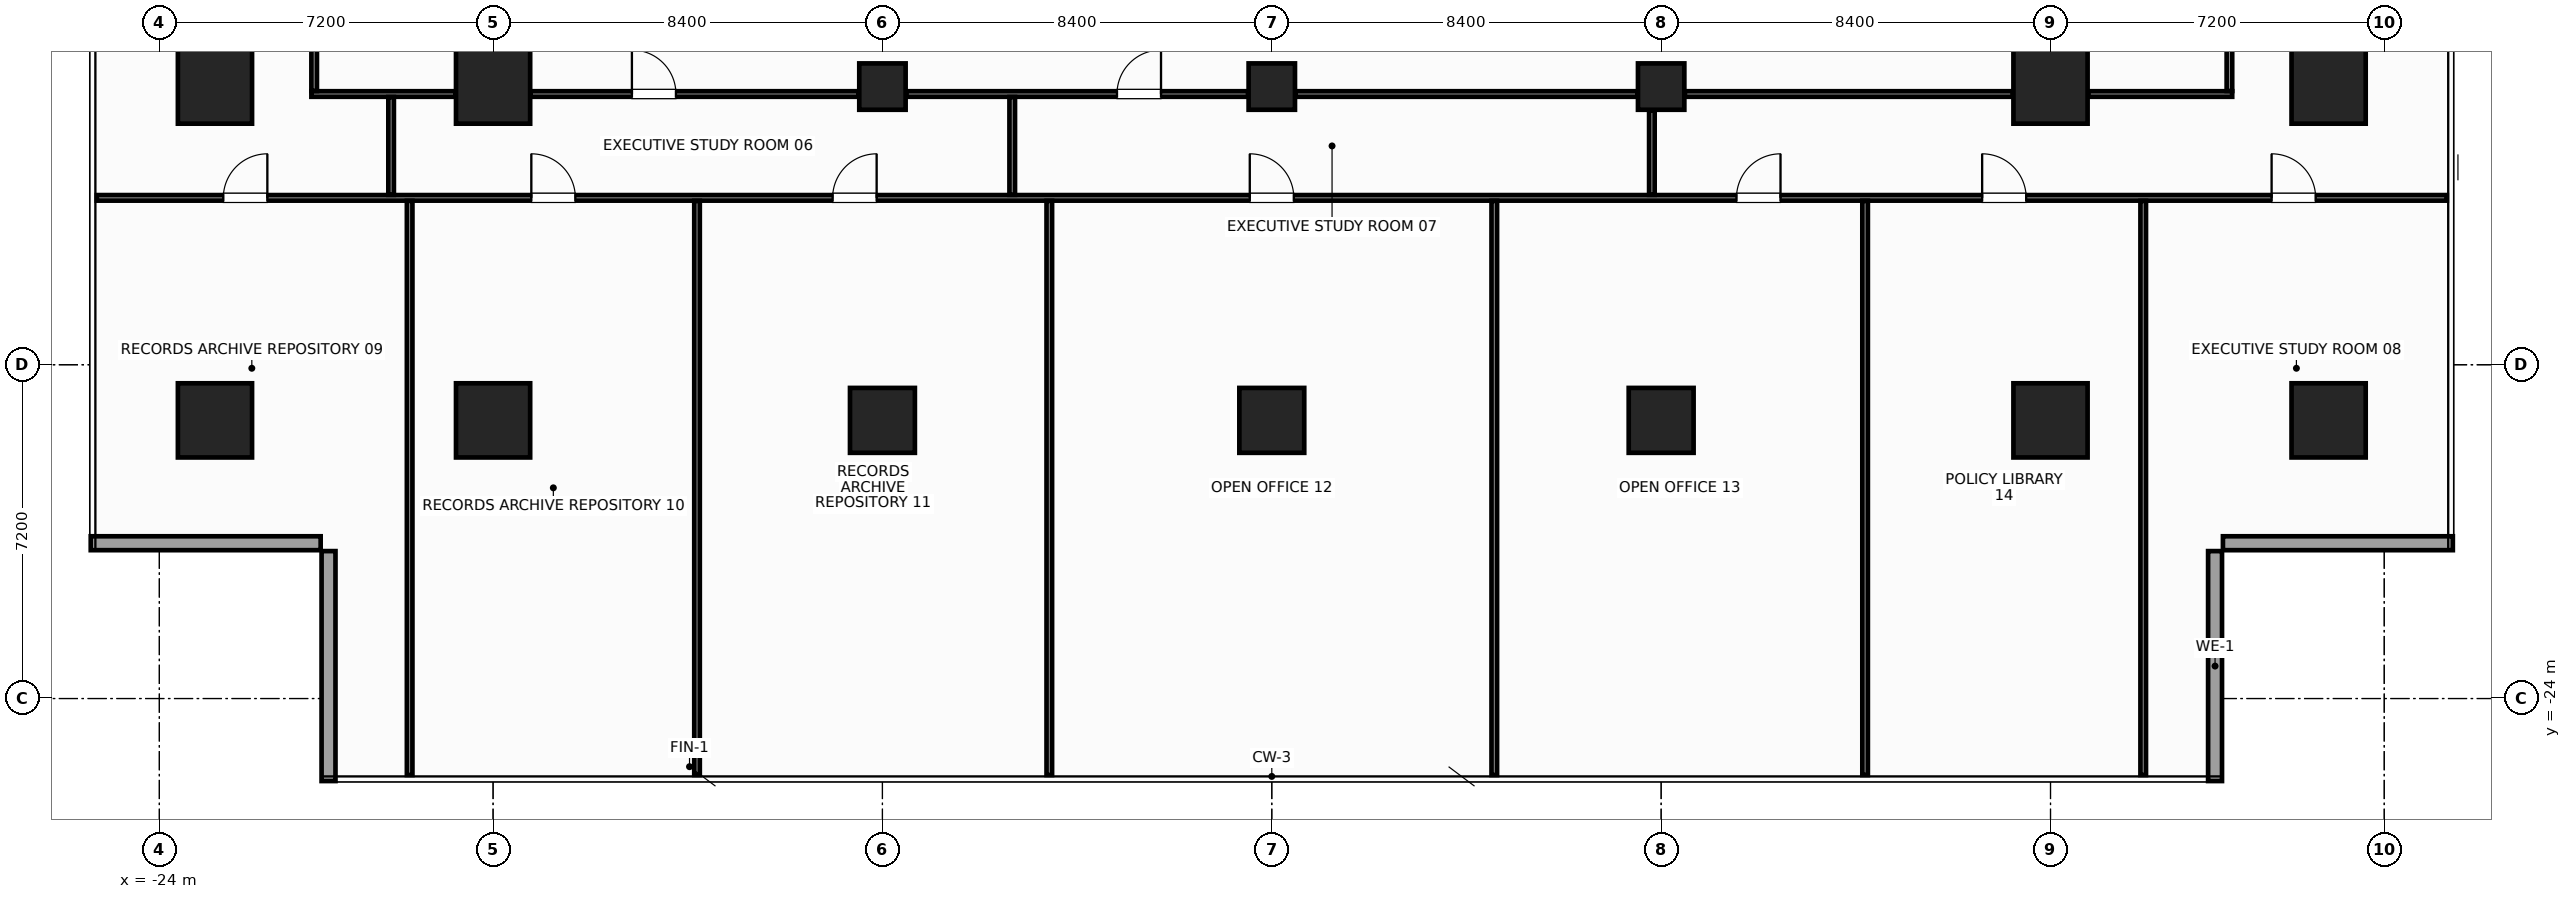
"""IFC4 building model, lengths in metres.
Left out: names, types, materials, properties, quantities, classifications, styles, units other than length and angle.
Written with IfcOpenShell. Run it as: python <this file> out.ifc"""

import sys

from ifc_helpers import new_model, si_unit, direction, frame, frame_2d, origin, origin_2d, place, context, subcontext, project, spatial, rectangle, hollow_rectangle, extrude, source, transform, mapped, element, fill, save


model = new_model("IFC4")
c1 = context("Model", 3, precision=1e-05, world=origin(), true_north=direction((0.0, 1.0)))
c2 = subcontext(c1, "Body", "Model", "MODEL_VIEW")
j1 = project(units=[si_unit("LENGTHUNIT", "METRE"), si_unit("PLANEANGLEUNIT", "RADIAN")], contexts=[c1])
p1 = place(None, origin())
s1 = spatial("IfcSite", under=j1, at=p1, CompositionType="ELEMENT")
p2 = place(p1, origin())
s2 = spatial("IfcBuilding", under=s1, at=p2, CompositionType="ELEMENT")
p3 = place(p2, frame((0.0, 0.0, 84.8)))
s3 = spatial("IfcBuildingStorey", under=s2, at=p3, CompositionType="ELEMENT", Elevation=84.8)
m1 = source(origin(), c2, "Body", "SweptSolid", [
    extrude(rectangle(XDim=1.6, YDim=1.6, at=origin_2d()), origin(), (0.0, 0.0, 1.0), 3.6),
])
for number, where, z_axis, x_axis in (
    (1, (-16.8, -18.0, 0.0), (0.0, 0.0, 1.0), (1.0, 0.0, 0.0)),
    (2, (-16.8, -10.8, 0.0), (0.0, 0.0, 1.0), (1.0, 0.0, 0.0)),
    (3, (16.8, -18.0, 0.0), (0.0, 0.0, 1.0), (1.0, 0.0, 0.0)),
    (4, (16.8, -10.8, 0.0), (0.0, 0.0, 1.0), (1.0, 0.0, 0.0)),
    (5, (-22.8, -18.0, 0.0), (0.0, 0.0, 1.0), (1.0, 0.0, 0.0)),
    (6, (-22.8, -10.8, 0.0), (0.0, 0.0, 1.0), (1.0, 0.0, 0.0)),
    (7, (22.8, -18.0, 0.0), (0.0, 0.0, 1.0), (1.0, 0.0, 0.0)),
    (8, (22.8, -10.8, 0.0), (0.0, 0.0, 1.0), (1.0, 0.0, 0.0)),
):
    element("IfcColumn", number, at=place(p3, frame(where, z_axis=z_axis, x_axis=x_axis)), inside=s3, PredefinedType="COLUMN", context=c2, shape_type="MappedRepresentation", body=[
        mapped(m1, transform((0.0, 0.0, 0.0), x_axis=(1.0, 0.0, 0.0), y_axis=(0.0, 1.0, 0.0), z_axis=(0.0, 0.0, 1.0), scale=1.0)),
    ])
m2 = source(origin(), c2, "Body", "SweptSolid", [
    extrude(rectangle(XDim=1.4, YDim=1.4, at=origin_2d()), origin(), (0.0, 0.0, 1.0), 3.6),
])
p4 = place(p3, frame((-8.4, -18.0, 0.0), z_axis=(0.0, 0.0, 1.0), x_axis=(1.0, 0.0, 0.0)))
e9 = element("IfcColumn", 9, at=p4, inside=s3, PredefinedType="COLUMN", context=c2, shape_type="MappedRepresentation", body=[
    mapped(m2, transform((0.0, 0.0, 0.0), x_axis=(1.0, 0.0, 0.0), y_axis=(0.0, 1.0, 0.0), z_axis=(0.0, 0.0, 1.0), scale=1.0)),
])
m3 = source(origin(), c2, "Body", "SweptSolid", [
    extrude(hollow_rectangle(XDim=1.0, YDim=1.0, WallThickness=0.045, at=origin_2d()), origin(), (0.0, 0.0, 1.0), 3.6),
])
p5 = place(p3, frame((-8.4, -10.8, 0.0), z_axis=(0.0, 0.0, 1.0), x_axis=(1.0, 0.0, 0.0)))
e10 = element("IfcColumn", 10, at=p5, inside=s3, PredefinedType="COLUMN", context=c2, shape_type="MappedRepresentation", body=[
    mapped(m3, transform((0.0, 0.0, 0.0), x_axis=(1.0, 0.0, 0.0), y_axis=(0.0, 1.0, 0.0), z_axis=(0.0, 0.0, 1.0), scale=1.0)),
])
p6 = place(p3, frame((8.4, -18.0, 0.0), z_axis=(0.0, 0.0, 1.0), x_axis=(1.0, 0.0, 0.0)))
e11 = element("IfcColumn", 11, at=p6, inside=s3, PredefinedType="COLUMN", context=c2, shape_type="MappedRepresentation", body=[
    mapped(m2, transform((0.0, 0.0, 0.0), x_axis=(1.0, 0.0, 0.0), y_axis=(0.0, 1.0, 0.0), z_axis=(0.0, 0.0, 1.0), scale=1.0)),
])
p7 = place(p3, frame((8.4, -10.8, 0.0), z_axis=(0.0, 0.0, 1.0), x_axis=(1.0, 0.0, 0.0)))
e12 = element("IfcColumn", 12, at=p7, inside=s3, PredefinedType="COLUMN", context=c2, shape_type="MappedRepresentation", body=[
    mapped(m3, transform((0.0, 0.0, 0.0), x_axis=(1.0, 0.0, 0.0), y_axis=(0.0, 1.0, 0.0), z_axis=(0.0, 0.0, 1.0), scale=1.0)),
])
p8 = place(p3, frame((0.0, -18.0, 0.0), z_axis=(0.0, 0.0, 1.0), x_axis=(1.0, 0.0, 0.0)))
e13 = element("IfcColumn", 13, at=p8, inside=s3, PredefinedType="COLUMN", context=c2, shape_type="MappedRepresentation", body=[
    mapped(m2, transform((0.0, 0.0, 0.0), x_axis=(1.0, 0.0, 0.0), y_axis=(0.0, 1.0, 0.0), z_axis=(0.0, 0.0, 1.0), scale=1.0)),
])
m4 = source(origin(), c2, "Body", "SweptSolid", [
    extrude(rectangle(XDim=1.0, YDim=1.0, at=origin_2d()), origin(), (0.0, 0.0, 1.0), 3.6),
])
p9 = place(p3, frame((0.0, -10.8, 0.0), z_axis=(0.0, 0.0, 1.0), x_axis=(1.0, 0.0, 0.0)))
e14 = element("IfcColumn", 14, at=p9, inside=s3, PredefinedType="COLUMN", context=c2, shape_type="MappedRepresentation", body=[
    mapped(m4, transform((0.0, 0.0, 0.0), x_axis=(1.0, 0.0, 0.0), y_axis=(0.0, 1.0, 0.0), z_axis=(0.0, 0.0, 1.0), scale=1.0)),
])
m5 = source(origin(), c2, "Body", "SweptSolid", [
    extrude(rectangle(XDim=4.96, YDim=0.3, at=frame_2d((2.48, 0.0))), origin(), (0.0, 0.0, 1.0), 2.74),
])
for number, where, z_axis, x_axis in (
    (15, (20.35, -25.78, 0.0), (0.0, 0.0, 1.0), (0.0, 1.0, 0.0)),
    (16, (20.52, -20.65, 0.0), (0.0, 0.0, 1.0), (1.0, 0.0, 0.0)),
    (17, (-25.48, -20.65, 0.0), (0.0, 0.0, 1.0), (1.0, 0.0, 0.0)),
    (18, (-20.35, -20.82, 0.0), (0.0, 0.0, 1.0), (0.0, -1.0, 0.0)),
):
    element("IfcWall", number, at=place(p3, frame(where, z_axis=z_axis, x_axis=x_axis)), inside=s3, PredefinedType="STANDARD", context=c2, shape_type="MappedRepresentation", body=[
        mapped(m5, transform((0.0, 0.0, 0.0), x_axis=(1.0, 0.0, 0.0), y_axis=(0.0, 1.0, 0.0), z_axis=(0.0, 0.0, 1.0), scale=1.0)),
    ])
m6 = source(origin(), c2, "Body", "SweptSolid", [
    extrude(rectangle(XDim=3.11, YDim=0.12, at=frame_2d((1.555, 0.0))), origin(), (0.0, 0.0, 1.0), 2.745),
])
p10 = place(p3, frame((-20.72, -10.96, 0.0), z_axis=(0.0, 0.0, 1.0), x_axis=(1.0, 0.0, 0.0)))
e19 = element("IfcWall", 19, at=p10, inside=s3, PredefinedType="PARTITIONING", context=c2, shape_type="MappedRepresentation", body=[
    mapped(m6, transform((0.0, 0.0, 0.0), x_axis=(1.0, 0.0, 0.0), y_axis=(0.0, 1.0, 0.0), z_axis=(0.0, 0.0, 1.0), scale=1.0)),
])
m7 = source(origin(), c2, "Body", "SweptSolid", [
    extrude(rectangle(XDim=7.08, YDim=0.12, at=frame_2d((3.54, 0.0))), origin(), (0.0, 0.0, 1.0), 2.745),
])
p11 = place(p3, frame((-15.99, -10.96, 0.0), z_axis=(0.0, 0.0, 1.0), x_axis=(1.0, 0.0, 0.0)))
e20 = element("IfcWall", 20, at=p11, inside=s3, PredefinedType="PARTITIONING", context=c2, shape_type="MappedRepresentation", body=[
    mapped(m7, transform((0.0, 0.0, 0.0), x_axis=(1.0, 0.0, 0.0), y_axis=(0.0, 1.0, 0.0), z_axis=(0.0, 0.0, 1.0), scale=1.0)),
])
p12 = place(p11, frame((2.185, 0.0, 0.0)))
e21 = element("IfcOpeningElement", 21, at=p12, cuts=e20, PredefinedType="OPENING", context=c2, shape_type="SweptSolid", body=[
    extrude(rectangle(XDim=0.95, YDim=2.15, at=frame_2d((0.475, 1.075))), frame((0.0, 0.072, 0.0), z_axis=(0.0, -1.0, 0.0), x_axis=(1.0, 0.0, 0.0)), (0.0, 0.0, 1.0), 0.144),
])
m8 = source(origin(), c2, "Body", "SweptSolid", [
    extrude(rectangle(XDim=7.38, YDim=0.12, at=frame_2d((3.69, 0.0))), origin(), (0.0, 0.0, 1.0), 2.745),
])
p13 = place(p3, frame((-7.89, -10.96, 0.0), z_axis=(0.0, 0.0, 1.0), x_axis=(1.0, 0.0, 0.0)))
e22 = element("IfcWall", 22, at=p13, inside=s3, PredefinedType="PARTITIONING", context=c2, shape_type="MappedRepresentation", body=[
    mapped(m8, transform((0.0, 0.0, 0.0), x_axis=(1.0, 0.0, 0.0), y_axis=(0.0, 1.0, 0.0), z_axis=(0.0, 0.0, 1.0), scale=1.0)),
])
p14 = place(p13, frame((4.55, 0.0, 0.0)))
e23 = element("IfcOpeningElement", 23, at=p14, cuts=e22, PredefinedType="OPENING", context=c2, shape_type="SweptSolid", body=[
    extrude(rectangle(XDim=0.95, YDim=2.15, at=frame_2d((0.475, 1.075))), frame((0.0, 0.072, 0.0), z_axis=(0.0, -1.0, 0.0), x_axis=(1.0, 0.0, 0.0)), (0.0, 0.0, 1.0), 0.144),
])
p15 = place(p3, frame((0.51, -10.96, 0.0), z_axis=(0.0, 0.0, 1.0), x_axis=(1.0, 0.0, 0.0)))
e24 = element("IfcWall", 24, at=p15, inside=s3, PredefinedType="PARTITIONING", context=c2, shape_type="MappedRepresentation", body=[
    mapped(m8, transform((0.0, 0.0, 0.0), x_axis=(1.0, 0.0, 0.0), y_axis=(0.0, 1.0, 0.0), z_axis=(0.0, 0.0, 1.0), scale=1.0)),
])
p16 = place(p3, frame((8.91, -10.96, 0.0), z_axis=(0.0, 0.0, 1.0), x_axis=(1.0, 0.0, 0.0)))
e25 = element("IfcWall", 25, at=p16, inside=s3, PredefinedType="PARTITIONING", context=c2, shape_type="MappedRepresentation", body=[
    mapped(m7, transform((0.0, 0.0, 0.0), x_axis=(1.0, 0.0, 0.0), y_axis=(0.0, 1.0, 0.0), z_axis=(0.0, 0.0, 1.0), scale=1.0)),
])
p17 = place(p3, frame((17.61, -10.96, 0.0), z_axis=(0.0, 0.0, 1.0), x_axis=(1.0, 0.0, 0.0)))
e26 = element("IfcWall", 26, at=p17, inside=s3, PredefinedType="PARTITIONING", context=c2, shape_type="MappedRepresentation", body=[
    mapped(m6, transform((0.0, 0.0, 0.0), x_axis=(1.0, 0.0, 0.0), y_axis=(0.0, 1.0, 0.0), z_axis=(0.0, 0.0, 1.0), scale=1.0)),
])
m9 = source(origin(), c2, "Body", "SweptSolid", [
    extrude(rectangle(XDim=2.09, YDim=0.12, at=frame_2d((1.045, 0.0))), origin(), (0.0, 0.0, 1.0), 3.36),
])
for number, where, z_axis, x_axis in (
    (27, (-20.66, -10.895, 0.0), (0.0, 0.0, 1.0), (0.0, 1.0, 0.0)),
    (28, (20.66, -10.895, 0.0), (0.0, 0.0, 1.0), (0.0, 1.0, 0.0)),
):
    element("IfcWall", number, at=place(p3, frame(where, z_axis=z_axis, x_axis=x_axis)), inside=s3, PredefinedType="PARTITIONING", context=c2, shape_type="MappedRepresentation", body=[
        mapped(m9, transform((0.0, 0.0, 0.0), x_axis=(1.0, 0.0, 0.0), y_axis=(0.0, 1.0, 0.0), z_axis=(0.0, 0.0, 1.0), scale=1.0)),
    ])
m10 = source(origin(), c2, "Body", "SweptSolid", [
    extrude(rectangle(XDim=50.7, YDim=0.12, at=frame_2d((25.35, 0.0))), origin(), (0.0, 0.0, 1.0), 2.945),
])
p18 = place(p3, frame((-25.35, -13.2, 0.0), z_axis=(0.0, 0.0, 1.0), x_axis=(1.0, 0.0, 0.0)))
e29 = element("IfcWall", 29, at=p18, inside=s3, PredefinedType="PARTITIONING", context=c2, shape_type="MappedRepresentation", body=[
    mapped(m10, transform((0.0, 0.0, 0.0), x_axis=(1.0, 0.0, 0.0), y_axis=(0.0, 1.0, 0.0), z_axis=(0.0, 0.0, 1.0), scale=1.0)),
])
p19 = place(p18, frame((46.92, 0.0, 0.0)))
e30 = element("IfcOpeningElement", 30, at=p19, cuts=e29, PredefinedType="OPENING", context=c2, shape_type="SweptSolid", body=[
    extrude(rectangle(XDim=0.95, YDim=2.15, at=frame_2d((0.475, 1.075))), frame((0.0, 0.072, 0.0), z_axis=(0.0, -1.0, 0.0), x_axis=(1.0, 0.0, 0.0)), (0.0, 0.0, 1.0), 0.144),
])
p20 = place(p18, frame((2.73, 0.0, 0.0)))
e31 = element("IfcOpeningElement", 31, at=p20, cuts=e29, PredefinedType="OPENING", context=c2, shape_type="SweptSolid", body=[
    extrude(rectangle(XDim=0.95, YDim=2.15, at=frame_2d((0.475, 1.075))), frame((0.0, 0.072, 0.0), z_axis=(0.0, -1.0, 0.0), x_axis=(1.0, 0.0, 0.0)), (0.0, 0.0, 1.0), 0.144),
])
p21 = place(p18, frame((9.375, 0.0, 0.0)))
e32 = element("IfcOpeningElement", 32, at=p21, cuts=e29, PredefinedType="OPENING", context=c2, shape_type="SweptSolid", body=[
    extrude(rectangle(XDim=0.95, YDim=2.15, at=frame_2d((0.475, 1.075))), frame((0.0, 0.072, 0.0), z_axis=(0.0, -1.0, 0.0), x_axis=(1.0, 0.0, 0.0)), (0.0, 0.0, 1.0), 0.144),
])
p22 = place(p18, frame((15.875, 0.0, 0.0)))
e33 = element("IfcOpeningElement", 33, at=p22, cuts=e29, PredefinedType="OPENING", context=c2, shape_type="SweptSolid", body=[
    extrude(rectangle(XDim=0.95, YDim=2.15, at=frame_2d((0.475, 1.075))), frame((0.0, 0.072, 0.0), z_axis=(0.0, -1.0, 0.0), x_axis=(1.0, 0.0, 0.0)), (0.0, 0.0, 1.0), 0.144),
])
p23 = place(p18, frame((24.875, 0.0, 0.0)))
e34 = element("IfcOpeningElement", 34, at=p23, cuts=e29, PredefinedType="OPENING", context=c2, shape_type="SweptSolid", body=[
    extrude(rectangle(XDim=0.95, YDim=2.15, at=frame_2d((0.475, 1.075))), frame((0.0, 0.072, 0.0), z_axis=(0.0, -1.0, 0.0), x_axis=(1.0, 0.0, 0.0)), (0.0, 0.0, 1.0), 0.144),
])
p24 = place(p18, frame((35.375, 0.0, 0.0)))
e35 = element("IfcOpeningElement", 35, at=p24, cuts=e29, PredefinedType="OPENING", context=c2, shape_type="SweptSolid", body=[
    extrude(rectangle(XDim=0.95, YDim=2.15, at=frame_2d((0.475, 1.075))), frame((0.0, 0.072, 0.0), z_axis=(0.0, -1.0, 0.0), x_axis=(1.0, 0.0, 0.0)), (0.0, 0.0, 1.0), 0.144),
])
p25 = place(p18, frame((40.675, 0.0, 0.0)))
e36 = element("IfcOpeningElement", 36, at=p25, cuts=e29, PredefinedType="OPENING", context=c2, shape_type="SweptSolid", body=[
    extrude(rectangle(XDim=0.95, YDim=2.15, at=frame_2d((0.475, 1.075))), frame((0.0, 0.072, 0.0), z_axis=(0.0, -1.0, 0.0), x_axis=(1.0, 0.0, 0.0)), (0.0, 0.0, 1.0), 0.144),
])
m11 = source(origin(), c2, "Body", "SweptSolid", [
    extrude(rectangle(XDim=2.11, YDim=0.12, at=frame_2d((1.055, 0.0))), origin(), (0.0, 0.0, 1.0), 3.36),
])
for number, where, z_axis, x_axis in (
    (37, (-19.0, -13.135, 0.0), (0.0, 0.0, 1.0), (0.0, 1.0, 0.0)),
    (38, (-5.6, -13.135, 0.0), (0.0, 0.0, 1.0), (0.0, 1.0, 0.0)),
):
    element("IfcWall", number, at=place(p3, frame(where, z_axis=z_axis, x_axis=x_axis)), inside=s3, PredefinedType="PARTITIONING", context=c2, shape_type="MappedRepresentation", body=[
        mapped(m11, transform((0.0, 0.0, 0.0), x_axis=(1.0, 0.0, 0.0), y_axis=(0.0, 1.0, 0.0), z_axis=(0.0, 0.0, 1.0), scale=1.0)),
    ])
m12 = source(origin(), c2, "Body", "SweptSolid", [
    extrude(rectangle(XDim=1.825, YDim=0.12, at=frame_2d((0.913, 0.0))), origin(), (0.0, 0.0, 1.0), 2.945),
])
p26 = place(p3, frame((8.2, -13.135, 0.0), z_axis=(0.0, 0.0, 1.0), x_axis=(0.0, 1.0, 0.0)))
e39 = element("IfcWall", 39, at=p26, inside=s3, PredefinedType="PARTITIONING", context=c2, shape_type="MappedRepresentation", body=[
    mapped(m12, transform((0.0, 0.0, 0.0), x_axis=(1.0, 0.0, 0.0), y_axis=(0.0, 1.0, 0.0), z_axis=(0.0, 0.0, 1.0), scale=1.0)),
])
m13 = source(origin(), c2, "Body", "SweptSolid", [
    extrude(rectangle(XDim=12.385, YDim=0.12, at=frame_2d((6.192, 0.0))), origin(), (0.0, 0.0, 1.0), 2.745),
])
for number, where, z_axis, x_axis in (
    (40, (-18.6, -25.65, 0.0), (0.0, 0.0, 1.0), (0.0, 1.0, 0.0)),
    (41, (-12.4, -25.65, 0.0), (0.0, 0.0, 1.0), (0.0, 1.0, 0.0)),
    (42, (-4.8, -25.65, 0.0), (0.0, 0.0, 1.0), (0.0, 1.0, 0.0)),
    (43, (4.8, -25.65, 0.0), (0.0, 0.0, 1.0), (0.0, 1.0, 0.0)),
    (44, (12.8, -25.65, 0.0), (0.0, 0.0, 1.0), (0.0, 1.0, 0.0)),
    (45, (18.8, -25.65, 0.0), (0.0, 0.0, 1.0), (0.0, 1.0, 0.0)),
):
    element("IfcWall", number, at=place(p3, frame(where, z_axis=z_axis, x_axis=x_axis)), inside=s3, PredefinedType="PARTITIONING", context=c2, shape_type="MappedRepresentation", body=[
        mapped(m13, transform((0.0, 0.0, 0.0), x_axis=(1.0, 0.0, 0.0), y_axis=(0.0, 1.0, 0.0), z_axis=(0.0, 0.0, 1.0), scale=1.0)),
    ])
m14 = source(origin(), c2, "Body", "SweptSolid", [
    extrude(rectangle(XDim=0.95, YDim=2.15, at=frame_2d((0.475, 1.075))), frame((0.0, 0.025, 0.0), z_axis=(0.0, -1.0, 0.0), x_axis=(1.0, 0.0, 0.0)), (0.0, 0.0, 1.0), 0.05),
])
p27 = place(p12, origin())
e46 = element("IfcDoor", 46, at=p27, inside=s3, OperationType="SINGLE_SWING_LEFT", PredefinedType="DOOR", context=c2, shape_type="MappedRepresentation", body=[
    mapped(m14, transform((0.0, 0.0, 0.0), x_axis=(1.0, 0.0, 0.0), y_axis=(0.0, 1.0, 0.0), z_axis=(0.0, 0.0, 1.0), scale=1.0)),
])
fill(e21, e46)
p28 = place(p14, origin())
e47 = element("IfcDoor", 47, at=p28, inside=s3, OperationType="SINGLE_SWING_RIGHT", PredefinedType="DOOR", context=c2, shape_type="MappedRepresentation", body=[
    mapped(m14, transform((0.0, 0.0, 0.0), x_axis=(1.0, 0.0, 0.0), y_axis=(0.0, 1.0, 0.0), z_axis=(0.0, 0.0, 1.0), scale=1.0)),
])
fill(e23, e47)
p29 = place(p19, origin())
e48 = element("IfcDoor", 48, at=p29, inside=s3, OperationType="SINGLE_SWING_LEFT", PredefinedType="DOOR", context=c2, shape_type="MappedRepresentation", body=[
    mapped(m14, transform((0.0, 0.0, 0.0), x_axis=(1.0, 0.0, 0.0), y_axis=(0.0, 1.0, 0.0), z_axis=(0.0, 0.0, 1.0), scale=1.0)),
])
fill(e30, e48)
p30 = place(p20, origin())
e49 = element("IfcDoor", 49, at=p30, inside=s3, OperationType="SINGLE_SWING_RIGHT", PredefinedType="DOOR", context=c2, shape_type="MappedRepresentation", body=[
    mapped(m14, transform((0.0, 0.0, 0.0), x_axis=(1.0, 0.0, 0.0), y_axis=(0.0, 1.0, 0.0), z_axis=(0.0, 0.0, 1.0), scale=1.0)),
])
fill(e31, e49)
p31 = place(p21, origin())
e50 = element("IfcDoor", 50, at=p31, inside=s3, OperationType="SINGLE_SWING_LEFT", PredefinedType="DOOR", context=c2, shape_type="MappedRepresentation", body=[
    mapped(m14, transform((0.0, 0.0, 0.0), x_axis=(1.0, 0.0, 0.0), y_axis=(0.0, 1.0, 0.0), z_axis=(0.0, 0.0, 1.0), scale=1.0)),
])
fill(e32, e50)
p32 = place(p22, origin())
e51 = element("IfcDoor", 51, at=p32, inside=s3, OperationType="SINGLE_SWING_RIGHT", PredefinedType="DOOR", context=c2, shape_type="MappedRepresentation", body=[
    mapped(m14, transform((0.0, 0.0, 0.0), x_axis=(1.0, 0.0, 0.0), y_axis=(0.0, 1.0, 0.0), z_axis=(0.0, 0.0, 1.0), scale=1.0)),
])
fill(e33, e51)
p33 = place(p23, origin())
e52 = element("IfcDoor", 52, at=p33, inside=s3, OperationType="SINGLE_SWING_LEFT", PredefinedType="DOOR", context=c2, shape_type="MappedRepresentation", body=[
    mapped(m14, transform((0.0, 0.0, 0.0), x_axis=(1.0, 0.0, 0.0), y_axis=(0.0, 1.0, 0.0), z_axis=(0.0, 0.0, 1.0), scale=1.0)),
])
fill(e34, e52)
p34 = place(p24, origin())
e53 = element("IfcDoor", 53, at=p34, inside=s3, OperationType="SINGLE_SWING_RIGHT", PredefinedType="DOOR", context=c2, shape_type="MappedRepresentation", body=[
    mapped(m14, transform((0.0, 0.0, 0.0), x_axis=(1.0, 0.0, 0.0), y_axis=(0.0, 1.0, 0.0), z_axis=(0.0, 0.0, 1.0), scale=1.0)),
])
fill(e35, e53)
p35 = place(p25, origin())
e54 = element("IfcDoor", 54, at=p35, inside=s3, OperationType="SINGLE_SWING_LEFT", PredefinedType="DOOR", context=c2, shape_type="MappedRepresentation", body=[
    mapped(m14, transform((0.0, 0.0, 0.0), x_axis=(1.0, 0.0, 0.0), y_axis=(0.0, 1.0, 0.0), z_axis=(0.0, 0.0, 1.0), scale=1.0)),
])
fill(e36, e54)
save(model, sys.argv[1])
